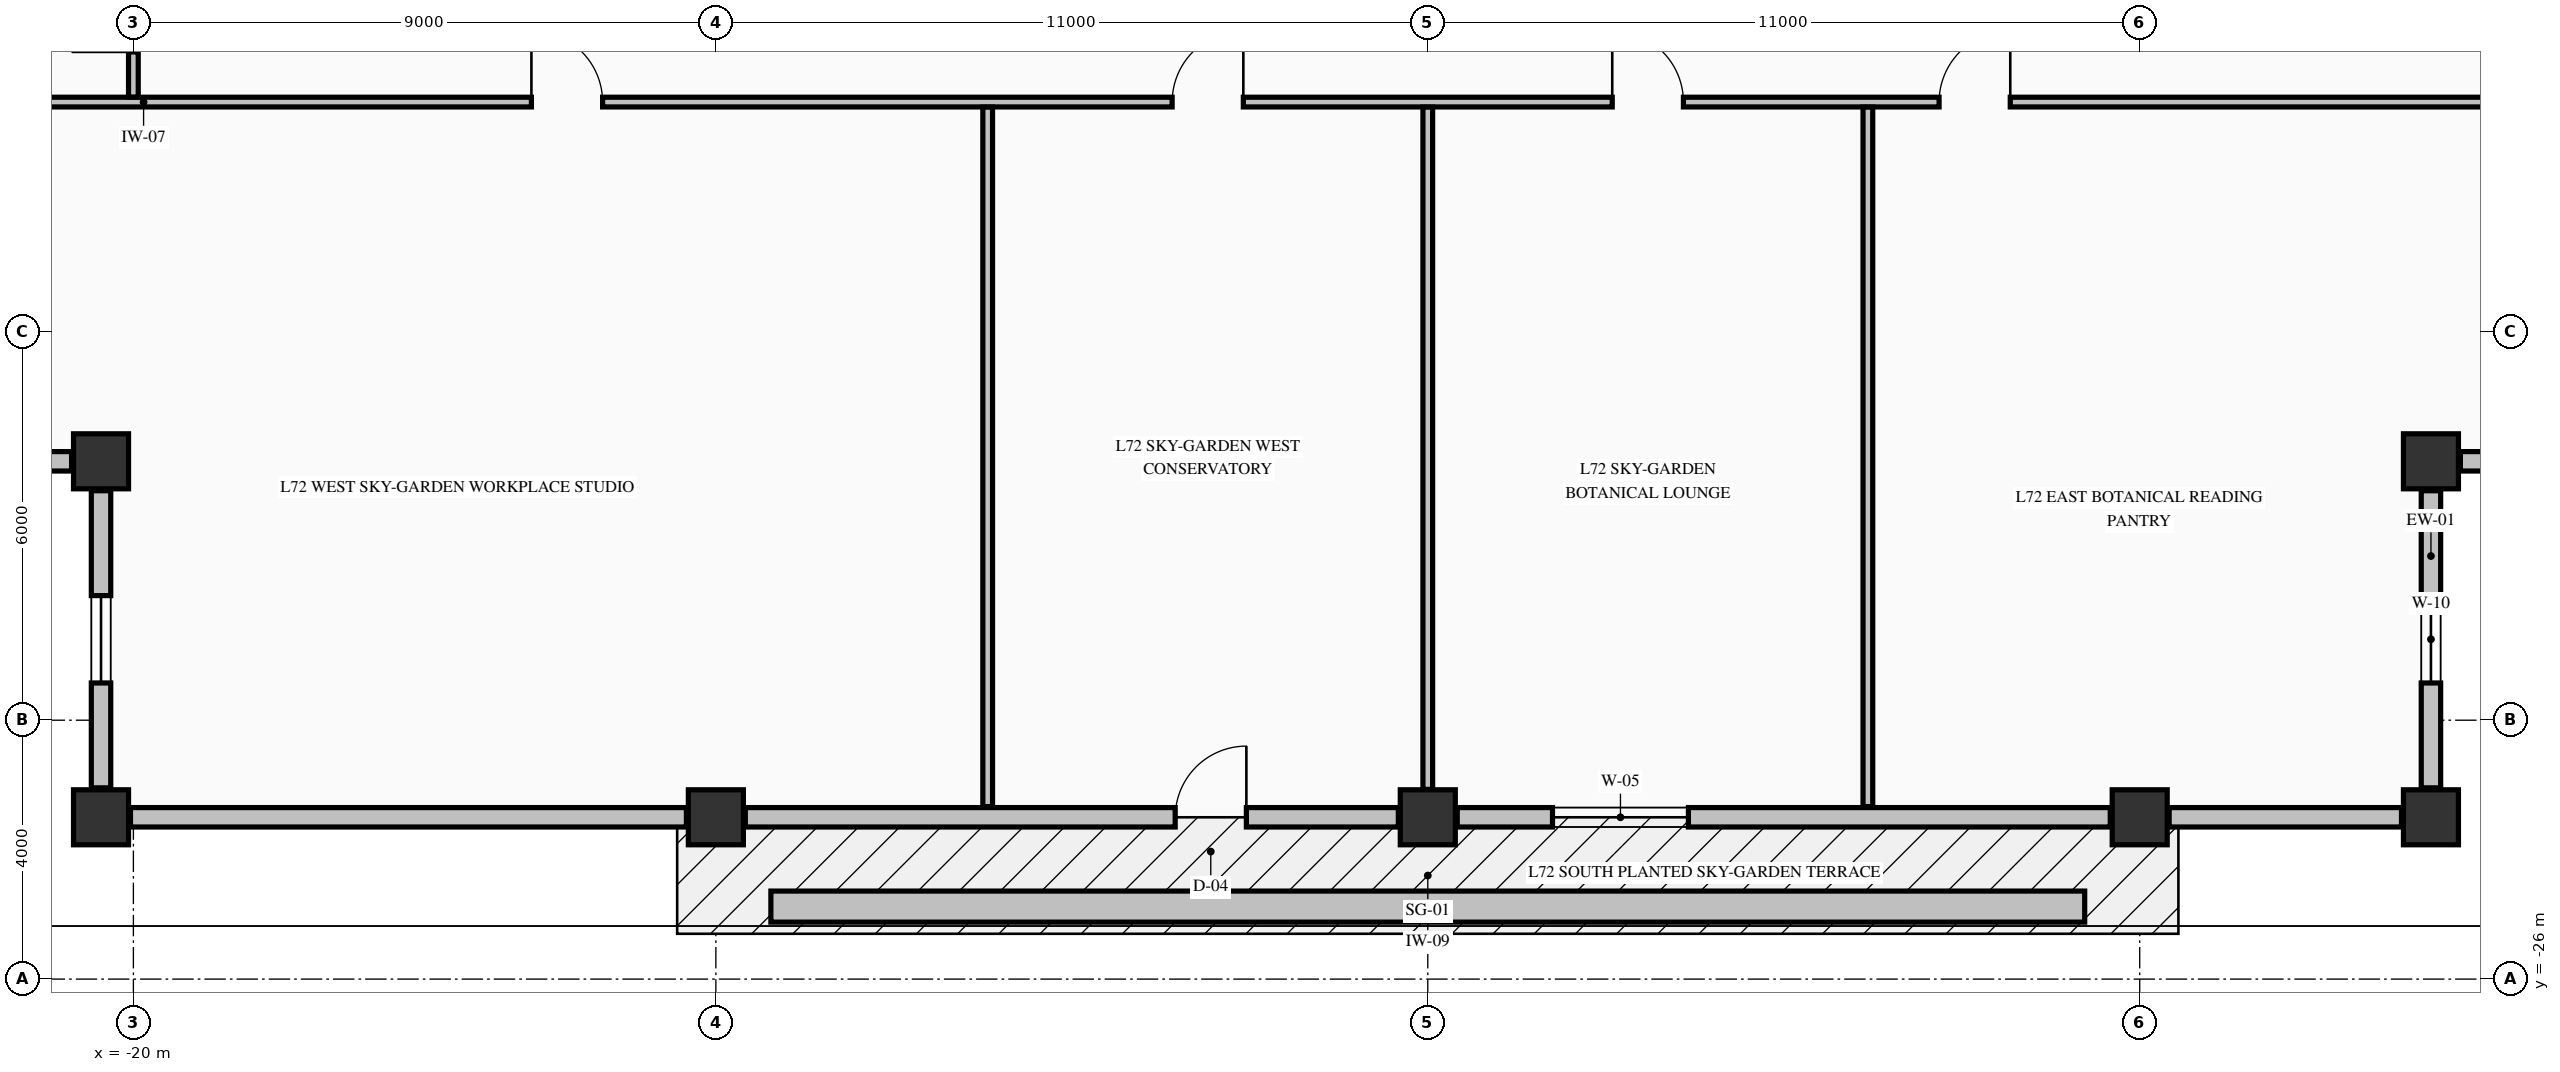
"""IFC4 building model, lengths in metres.
Left out: names, types, materials, properties, quantities, classifications, styles, units other than length and angle.
Written with IfcOpenShell. Run it as: python <this file> out.ifc"""

import sys

from ifc_helpers import new_model, si_unit, direction, frame, frame_2d, origin, origin_2d, place, context, subcontext, project, spatial, rectangle, extrude, element, fill, save


model = new_model("IFC4")
c1 = context("Model", 3, precision=1e-05, world=origin(), true_north=direction((0.0, 1.0)))
c2 = subcontext(c1, "Body", "Model", "MODEL_VIEW")
j1 = project(units=[si_unit("LENGTHUNIT", "METRE"), si_unit("PLANEANGLEUNIT", "RADIAN")], contexts=[c1])
p1 = place(None, origin())
s1 = spatial("IfcSite", under=j1, at=p1, CompositionType="ELEMENT")
p2 = place(p1, origin())
s2 = spatial("IfcBuilding", under=s1, at=p2, CompositionType="ELEMENT")
p3 = place(p2, frame((0.0, 0.0, 270.58)))
s3 = spatial("IfcBuildingStorey", under=s2, at=p3, CompositionType="ELEMENT", Elevation=270.58)
for number, where, z_axis, x_axis in (
    (1, (-20.5, -23.5, -0.325), (0.0, 0.0, 1.0), (1.0, 0.0, 0.0)),
    (2, (-11.0, -23.5, -0.325), (0.0, 0.0, 1.0), (1.0, 0.0, 0.0)),
    (3, (0.0, -23.5, -0.325), (0.0, 0.0, 1.0), (1.0, 0.0, 0.0)),
    (4, (11.0, -23.5, -0.325), (0.0, 0.0, 1.0), (1.0, 0.0, 0.0)),
    (5, (15.5, -23.5, -0.325), (0.0, 0.0, 1.0), (1.0, 0.0, 0.0)),
    (6, (-20.5, -18.0, -0.325), (0.0, 0.0, 1.0), (1.0, 0.0, 0.0)),
    (7, (15.5, -18.0, -0.325), (0.0, 0.0, 1.0), (1.0, 0.0, 0.0)),
):
    element("IfcColumn", number, at=place(p3, frame(where, z_axis=z_axis, x_axis=x_axis)), inside=s3, PredefinedType="COLUMN", context=c2, shape_type="SweptSolid", body=[
        extrude(rectangle(XDim=0.85, YDim=0.85, at=origin_2d()), origin(), (0.0, 0.0, 1.0), 3.815),
    ])
p4 = place(p3, frame((15.5, -23.045, 0.0), z_axis=(0.0, 0.0, 1.0), x_axis=(0.0, 1.0, 0.0)))
e8 = element("IfcWall", 8, at=p4, inside=s3, PredefinedType="STANDARD", context=c2, shape_type="SweptSolid", body=[
    extrude(rectangle(XDim=4.59, YDim=0.3, at=frame_2d((2.295, 0.0))), origin(), (0.0, 0.0, 1.0), 2.882),
])
p5 = place(p4, frame((1.62, 0.0, 0.68)))
e9 = element("IfcOpeningElement", 9, at=p5, cuts=e8, PredefinedType="OPENING", context=c2, shape_type="SweptSolid", body=[
    extrude(rectangle(XDim=1.35, YDim=1.42, at=frame_2d((0.675, 0.71))), frame((0.0, 0.16, 0.0), z_axis=(0.0, -1.0, 0.0), x_axis=(1.0, 0.0, 0.0)), (0.0, 0.0, 1.0), 0.32),
])
p6 = place(p3, frame((15.955, -18.0, 0.0), z_axis=(0.0, 0.0, 1.0), x_axis=(1.0, 0.0, 0.0)))
e10 = element("IfcWall", 10, at=p6, inside=s3, PredefinedType="STANDARD", context=c2, shape_type="SweptSolid", body=[
    extrude(rectangle(XDim=4.59, YDim=0.3, at=frame_2d((2.295, 0.0))), origin(), (0.0, 0.0, 1.0), 2.882),
])
p7 = place(p6, frame((1.62, 0.0, 0.68)))
e11 = element("IfcOpeningElement", 11, at=p7, cuts=e10, PredefinedType="OPENING", context=c2, shape_type="SweptSolid", body=[
    extrude(rectangle(XDim=1.35, YDim=1.42, at=frame_2d((0.675, 0.71))), frame((0.0, 0.16, 0.0), z_axis=(0.0, -1.0, 0.0), x_axis=(1.0, 0.0, 0.0)), (0.0, 0.0, 1.0), 0.32),
])
p8 = place(p3, frame((-25.545, -18.0, 0.0), z_axis=(0.0, 0.0, 1.0), x_axis=(1.0, 0.0, 0.0)))
e12 = element("IfcWall", 12, at=p8, inside=s3, PredefinedType="STANDARD", context=c2, shape_type="SweptSolid", body=[
    extrude(rectangle(XDim=4.59, YDim=0.3, at=frame_2d((2.295, 0.0))), origin(), (0.0, 0.0, 1.0), 2.882),
])
p9 = place(p8, frame((1.62, 0.0, 0.68)))
e13 = element("IfcOpeningElement", 13, at=p9, cuts=e12, PredefinedType="OPENING", context=c2, shape_type="SweptSolid", body=[
    extrude(rectangle(XDim=1.35, YDim=1.42, at=frame_2d((0.675, 0.71))), frame((0.0, 0.16, 0.0), z_axis=(0.0, -1.0, 0.0), x_axis=(1.0, 0.0, 0.0)), (0.0, 0.0, 1.0), 0.32),
])
p10 = place(p3, frame((-20.5, -18.455, 0.0), z_axis=(0.0, 0.0, 1.0), x_axis=(0.0, -1.0, 0.0)))
e14 = element("IfcWall", 14, at=p10, inside=s3, PredefinedType="STANDARD", context=c2, shape_type="SweptSolid", body=[
    extrude(rectangle(XDim=4.59, YDim=0.3, at=frame_2d((2.295, 0.0))), origin(), (0.0, 0.0, 1.0), 2.882),
])
p11 = place(p10, frame((1.62, 0.0, 0.68)))
e15 = element("IfcOpeningElement", 15, at=p11, cuts=e14, PredefinedType="OPENING", context=c2, shape_type="SweptSolid", body=[
    extrude(rectangle(XDim=1.35, YDim=1.42, at=frame_2d((0.675, 0.71))), frame((0.0, 0.16, 0.0), z_axis=(0.0, -1.0, 0.0), x_axis=(1.0, 0.0, 0.0)), (0.0, 0.0, 1.0), 0.32),
])
p12 = place(p3, frame((-20.045, -23.5, 0.0), z_axis=(0.0, 0.0, 1.0), x_axis=(1.0, 0.0, 0.0)))
e16 = element("IfcWall", 16, at=p12, inside=s3, PredefinedType="STANDARD", context=c2, shape_type="SweptSolid", body=[
    extrude(rectangle(XDim=8.59, YDim=0.3, at=frame_2d((4.295, 0.0))), origin(), (0.0, 0.0, 1.0), 2.882),
])
p13 = place(p3, frame((-10.545, -23.5, 0.0), z_axis=(0.0, 0.0, 1.0), x_axis=(1.0, 0.0, 0.0)))
e17 = element("IfcWall", 17, at=p13, inside=s3, PredefinedType="STANDARD", context=c2, shape_type="SweptSolid", body=[
    extrude(rectangle(XDim=10.09, YDim=0.3, at=frame_2d((5.045, 0.0))), origin(), (0.0, 0.0, 1.0), 2.882),
])
p14 = place(p13, frame((6.642, 0.0, 0.0)))
e18 = element("IfcOpeningElement", 18, at=p14, cuts=e17, PredefinedType="OPENING", context=c2, shape_type="SweptSolid", body=[
    extrude(rectangle(XDim=1.1, YDim=2.15, at=frame_2d((0.55, 1.075))), frame((0.0, 0.16, 0.0), z_axis=(0.0, -1.0, 0.0), x_axis=(1.0, 0.0, 0.0)), (0.0, 0.0, 1.0), 0.32),
])
p15 = place(p3, frame((0.455, -23.5, 0.0), z_axis=(0.0, 0.0, 1.0), x_axis=(1.0, 0.0, 0.0)))
e19 = element("IfcWall", 19, at=p15, inside=s3, PredefinedType="STANDARD", context=c2, shape_type="SweptSolid", body=[
    extrude(rectangle(XDim=10.09, YDim=0.3, at=frame_2d((5.045, 0.0))), origin(), (0.0, 0.0, 1.0), 2.882),
])
p16 = place(p15, frame((1.472, 0.0, 0.7)))
e20 = element("IfcOpeningElement", 20, at=p16, cuts=e19, PredefinedType="OPENING", context=c2, shape_type="SweptSolid", body=[
    extrude(rectangle(XDim=2.1, YDim=1.5, at=frame_2d((1.05, 0.75))), frame((0.0, 0.16, 0.0), z_axis=(0.0, -1.0, 0.0), x_axis=(1.0, 0.0, 0.0)), (0.0, 0.0, 1.0), 0.32),
])
p17 = place(p3, frame((11.455, -23.5, 0.0), z_axis=(0.0, 0.0, 1.0), x_axis=(1.0, 0.0, 0.0)))
e21 = element("IfcWall", 21, at=p17, inside=s3, PredefinedType="STANDARD", context=c2, shape_type="SweptSolid", body=[
    extrude(rectangle(XDim=3.59, YDim=0.3, at=frame_2d((1.795, 0.0))), origin(), (0.0, 0.0, 1.0), 2.882),
])
p18 = place(p3, frame((-25.835, -12.45, 0.0), z_axis=(0.0, 0.0, 1.0), x_axis=(1.0, 0.0, 0.0)))
e22 = element("IfcWall", 22, at=p18, inside=s3, PredefinedType="PARTITIONING", context=c2, shape_type="SweptSolid", body=[
    extrude(rectangle(XDim=45.91, YDim=0.15, at=frame_2d((22.955, 0.0))), origin(), (0.0, 0.0, 1.0), 3.49),
])
p19 = place(p18, frame((11.985, 0.0, 0.0)))
e23 = element("IfcOpeningElement", 23, at=p19, cuts=e22, PredefinedType="OPENING", context=c2, shape_type="SweptSolid", body=[
    extrude(rectangle(XDim=1.1, YDim=2.15, at=frame_2d((0.55, 1.075))), frame((0.0, 0.085, 0.0), z_axis=(0.0, -1.0, 0.0), x_axis=(1.0, 0.0, 0.0)), (0.0, 0.0, 1.0), 0.17),
])
p20 = place(p18, frame((21.885, 0.0, 0.0)))
e24 = element("IfcOpeningElement", 24, at=p20, cuts=e22, PredefinedType="OPENING", context=c2, shape_type="SweptSolid", body=[
    extrude(rectangle(XDim=1.1, YDim=2.15, at=frame_2d((0.55, 1.075))), frame((0.0, 0.085, 0.0), z_axis=(0.0, -1.0, 0.0), x_axis=(1.0, 0.0, 0.0)), (0.0, 0.0, 1.0), 0.17),
])
p21 = place(p18, frame((28.685, 0.0, 0.0)))
e25 = element("IfcOpeningElement", 25, at=p21, cuts=e22, PredefinedType="OPENING", context=c2, shape_type="SweptSolid", body=[
    extrude(rectangle(XDim=1.1, YDim=2.15, at=frame_2d((0.55, 1.075))), frame((0.0, 0.085, 0.0), z_axis=(0.0, -1.0, 0.0), x_axis=(1.0, 0.0, 0.0)), (0.0, 0.0, 1.0), 0.17),
])
p22 = place(p18, frame((33.735, 0.0, 0.0)))
e26 = element("IfcOpeningElement", 26, at=p22, cuts=e22, PredefinedType="OPENING", context=c2, shape_type="SweptSolid", body=[
    extrude(rectangle(XDim=1.1, YDim=2.15, at=frame_2d((0.55, 1.075))), frame((0.0, 0.085, 0.0), z_axis=(0.0, -1.0, 0.0), x_axis=(1.0, 0.0, 0.0)), (0.0, 0.0, 1.0), 0.17),
])
p23 = place(p3, frame((-20.0, -12.372, 0.0), z_axis=(0.0, 0.0, 1.0), x_axis=(0.0, 1.0, 0.0)))
e27 = element("IfcWall", 27, at=p23, inside=s3, PredefinedType="PARTITIONING", context=c2, shape_type="SweptSolid", body=[
    extrude(rectangle(XDim=2.066, YDim=0.15, at=frame_2d((1.033, 0.0))), origin(), (0.0, 0.0, 1.0), 3.49),
])
p24 = place(p23, frame((0.697, 0.0, 0.0)))
e28 = element("IfcOpeningElement", 28, at=p24, cuts=e27, PredefinedType="OPENING", context=c2, shape_type="SweptSolid", body=[
    extrude(rectangle(XDim=0.95, YDim=2.15, at=frame_2d((0.475, 1.075))), frame((0.0, 0.085, 0.0), z_axis=(0.0, -1.0, 0.0), x_axis=(1.0, 0.0, 0.0)), (0.0, 0.0, 1.0), 0.17),
])
p25 = place(p3, frame((-6.8, -23.335, 0.0), z_axis=(0.0, 0.0, 1.0), x_axis=(0.0, 1.0, 0.0)))
e29 = element("IfcWall", 29, at=p25, inside=s3, PredefinedType="PARTITIONING", context=c2, shape_type="SweptSolid", body=[
    extrude(rectangle(XDim=10.807, YDim=0.15, at=frame_2d((5.403, 0.0))), origin(), (0.0, 0.0, 1.0), 3.49),
])
p26 = place(p3, frame((0.0, -23.069, 0.0), z_axis=(0.0, 0.0, 1.0), x_axis=(0.0, 1.0, 0.0)))
e30 = element("IfcWall", 30, at=p26, inside=s3, PredefinedType="PARTITIONING", context=c2, shape_type="SweptSolid", body=[
    extrude(rectangle(XDim=10.541, YDim=0.15, at=frame_2d((5.271, 0.0))), origin(), (0.0, 0.0, 1.0), 3.49),
])
p27 = place(p3, frame((6.8, -23.335, 0.0), z_axis=(0.0, 0.0, 1.0), x_axis=(0.0, 1.0, 0.0)))
e31 = element("IfcWall", 31, at=p27, inside=s3, PredefinedType="PARTITIONING", context=c2, shape_type="SweptSolid", body=[
    extrude(rectangle(XDim=10.807, YDim=0.15, at=frame_2d((5.403, 0.0))), origin(), (0.0, 0.0, 1.0), 3.49),
])
p28 = place(p3, frame((-10.15, -24.88, -0.04), z_axis=(0.0, 0.0, 1.0), x_axis=(1.0, 0.0, 0.0)))
e32 = element("IfcWall", 32, at=p28, inside=s3, PredefinedType="PARAPET", context=c2, shape_type="SweptSolid", body=[
    extrude(rectangle(XDim=20.3, YDim=0.48, at=frame_2d((10.15, 0.0))), origin(), (0.0, 0.0, 1.0), 0.52),
])
p29 = place(p5, origin())
e33 = element("IfcWindow", 33, at=p29, inside=s3, PartitioningType="SINGLE_PANEL", PredefinedType="WINDOW", context=c2, shape_type="SweptSolid", body=[
    extrude(rectangle(XDim=1.35, YDim=1.42, at=frame_2d((0.675, 0.71))), frame((0.0, 0.03, 0.0), z_axis=(0.0, -1.0, 0.0), x_axis=(1.0, 0.0, 0.0)), (0.0, 0.0, 1.0), 0.06),
])
fill(e9, e33)
p30 = place(p11, origin())
e34 = element("IfcWindow", 34, at=p30, inside=s3, PartitioningType="SINGLE_PANEL", PredefinedType="WINDOW", context=c2, shape_type="SweptSolid", body=[
    extrude(rectangle(XDim=1.35, YDim=1.42, at=frame_2d((0.675, 0.71))), frame((0.0, 0.03, 0.0), z_axis=(0.0, -1.0, 0.0), x_axis=(1.0, 0.0, 0.0)), (0.0, 0.0, 1.0), 0.06),
])
fill(e15, e34)
p31 = place(p14, origin())
e35 = element("IfcDoor", 35, at=p31, inside=s3, OperationType="SINGLE_SWING_RIGHT", PredefinedType="DOOR", context=c2, shape_type="SweptSolid", body=[
    extrude(rectangle(XDim=1.1, YDim=2.15, at=frame_2d((0.55, 1.075))), frame((0.0, 0.025, 0.0), z_axis=(0.0, -1.0, 0.0), x_axis=(1.0, 0.0, 0.0)), (0.0, 0.0, 1.0), 0.05),
])
fill(e18, e35)
p32 = place(p16, origin())
e36 = element("IfcWindow", 36, at=p32, inside=s3, PartitioningType="SINGLE_PANEL", PredefinedType="WINDOW", context=c2, shape_type="SweptSolid", body=[
    extrude(rectangle(XDim=2.1, YDim=1.5, at=frame_2d((1.05, 0.75))), frame((0.0, 0.03, 0.0), z_axis=(0.0, -1.0, 0.0), x_axis=(1.0, 0.0, 0.0)), (0.0, 0.0, 1.0), 0.06),
])
fill(e20, e36)
p33 = place(p19, origin())
e37 = element("IfcDoor", 37, at=p33, inside=s3, OperationType="SINGLE_SWING_LEFT", PredefinedType="DOOR", context=c2, shape_type="SweptSolid", body=[
    extrude(rectangle(XDim=1.1, YDim=2.15, at=frame_2d((0.55, 1.075))), frame((0.0, 0.025, 0.0), z_axis=(0.0, -1.0, 0.0), x_axis=(1.0, 0.0, 0.0)), (0.0, 0.0, 1.0), 0.05),
])
fill(e23, e37)
p34 = place(p20, origin())
e38 = element("IfcDoor", 38, at=p34, inside=s3, OperationType="SINGLE_SWING_RIGHT", PredefinedType="DOOR", context=c2, shape_type="SweptSolid", body=[
    extrude(rectangle(XDim=1.1, YDim=2.15, at=frame_2d((0.55, 1.075))), frame((0.0, 0.025, 0.0), z_axis=(0.0, -1.0, 0.0), x_axis=(1.0, 0.0, 0.0)), (0.0, 0.0, 1.0), 0.05),
])
fill(e24, e38)
p35 = place(p21, origin())
e39 = element("IfcDoor", 39, at=p35, inside=s3, OperationType="SINGLE_SWING_LEFT", PredefinedType="DOOR", context=c2, shape_type="SweptSolid", body=[
    extrude(rectangle(XDim=1.1, YDim=2.15, at=frame_2d((0.55, 1.075))), frame((0.0, 0.025, 0.0), z_axis=(0.0, -1.0, 0.0), x_axis=(1.0, 0.0, 0.0)), (0.0, 0.0, 1.0), 0.05),
])
fill(e25, e39)
p36 = place(p22, origin())
e40 = element("IfcDoor", 40, at=p36, inside=s3, OperationType="SINGLE_SWING_RIGHT", PredefinedType="DOOR", context=c2, shape_type="SweptSolid", body=[
    extrude(rectangle(XDim=1.1, YDim=2.15, at=frame_2d((0.55, 1.075))), frame((0.0, 0.025, 0.0), z_axis=(0.0, -1.0, 0.0), x_axis=(1.0, 0.0, 0.0)), (0.0, 0.0, 1.0), 0.05),
])
fill(e26, e40)
save(model, sys.argv[1])
